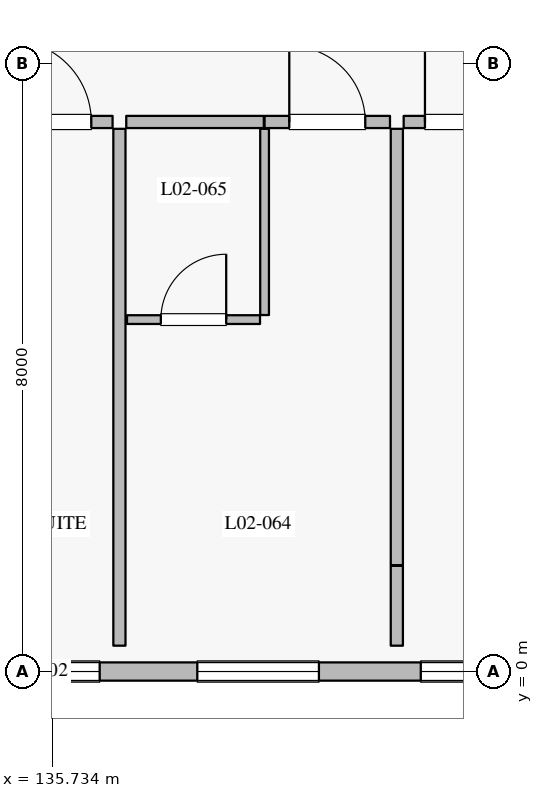
"""IFC4 building model, lengths in metres.
Left out: names, types, materials, properties, quantities, classifications, styles, units other than length and angle.
Written with IfcOpenShell. Run it as: python <this file> out.ifc"""

import sys

from ifc_helpers import new_model, si_unit, direction, frame, frame_2d, origin, place, context, subcontext, project, spatial, rectangle, extrude, element, fill, save


model = new_model("IFC4")
c1 = context("Model", 3, precision=1e-05, world=origin(), true_north=direction((0.0, 1.0)))
c2 = subcontext(c1, "Body", "Model", "MODEL_VIEW")
j1 = project(units=[si_unit("LENGTHUNIT", "METRE"), si_unit("PLANEANGLEUNIT", "RADIAN")], contexts=[c1])
p1 = place(None, origin())
s1 = spatial("IfcSite", under=j1, at=p1, CompositionType="ELEMENT")
p2 = place(p1, origin())
s2 = spatial("IfcBuilding", under=s1, at=p2, CompositionType="ELEMENT")
p3 = place(p2, frame((0.0, 0.0, 11.4)))
s3 = spatial("IfcBuildingStorey", under=s2, at=p3, CompositionType="ELEMENT", Elevation=11.4)
p4 = place(p3, frame((142.4, 0.0, 0.0), z_axis=(0.0, 0.0, 1.0), x_axis=(-1.0, 0.0, 0.0)))
e1 = element("IfcWall", 1, at=p4, inside=s3, PredefinedType="SOLIDWALL", context=c2, shape_type="SweptSolid", body=[
    extrude(rectangle(XDim=7.6, YDim=0.24, at=frame_2d((3.8, 0.0))), origin(), (0.0, 0.0, 1.0), 4.13),
])
p5 = place(p4, frame((0.215, 0.0, 0.8)))
e2 = element("IfcOpeningElement", 2, at=p5, cuts=e1, PredefinedType="OPENING", context=c2, shape_type="SweptSolid", body=[
    extrude(rectangle(XDim=1.6, YDim=1.6, at=frame_2d((0.8, 0.8))), frame((0.0, 0.13, 0.0), z_axis=(0.0, -1.0, 0.0), x_axis=(1.0, 0.0, 0.0)), (0.0, 0.0, 1.0), 0.26),
])
p6 = place(p4, frame((3.155, 0.0, 0.8)))
e3 = element("IfcOpeningElement", 3, at=p6, cuts=e1, PredefinedType="OPENING", context=c2, shape_type="SweptSolid", body=[
    extrude(rectangle(XDim=1.6, YDim=1.6, at=frame_2d((0.8, 0.8))), frame((0.0, 0.13, 0.0), z_axis=(0.0, -1.0, 0.0), x_axis=(1.0, 0.0, 0.0)), (0.0, 0.0, 1.0), 0.26),
])
p7 = place(p4, frame((6.04, 0.0, 0.8)))
e4 = element("IfcOpeningElement", 4, at=p7, cuts=e1, PredefinedType="OPENING", context=c2, shape_type="SweptSolid", body=[
    extrude(rectangle(XDim=1.4, YDim=1.6, at=frame_2d((0.7, 0.8))), frame((0.0, 0.13, 0.0), z_axis=(0.0, -1.0, 0.0), x_axis=(1.0, 0.0, 0.0)), (0.0, 0.0, 1.0), 0.26),
])
p8 = place(p3, frame((134.89, 7.23, 0.0), z_axis=(0.0, 0.0, 1.0), x_axis=(1.0, 0.0, 0.0)))
e5 = element("IfcWall", 5, at=p8, inside=s3, PredefinedType="PARTITIONING", context=c2, shape_type="SweptSolid", body=[
    extrude(rectangle(XDim=1.64, YDim=0.16, at=frame_2d((0.82, 0.0))), origin(), (0.0, 0.0, 1.0), 4.535),
])
p9 = place(p8, frame((0.28, 0.0, 0.0)))
e6 = element("IfcOpeningElement", 6, at=p9, cuts=e5, PredefinedType="OPENING", context=c2, shape_type="SweptSolid", body=[
    extrude(rectangle(XDim=1.08, YDim=2.3, at=frame_2d((0.54, 1.15))), frame((0.0, 0.09, 0.0), z_axis=(0.0, -1.0, 0.0), x_axis=(1.0, 0.0, 0.0)), (0.0, 0.0, 1.0), 0.18),
])
p10 = place(p3, frame((136.71, 7.23, 0.0), z_axis=(0.0, 0.0, 1.0), x_axis=(1.0, 0.0, 0.0)))
e7 = element("IfcWall", 7, at=p10, inside=s3, PredefinedType="PARTITIONING", context=c2, shape_type="SweptSolid", body=[
    extrude(rectangle(XDim=1.81, YDim=0.16, at=frame_2d((0.905, 0.0))), origin(), (0.0, 0.0, 1.0), 4.535),
])
p11 = place(p3, frame((138.53, 7.23, 0.0), z_axis=(0.0, 0.0, 1.0), x_axis=(1.0, 0.0, 0.0)))
e8 = element("IfcWall", 8, at=p11, inside=s3, PredefinedType="PARTITIONING", context=c2, shape_type="SweptSolid", body=[
    extrude(rectangle(XDim=1.65, YDim=0.16, at=frame_2d((0.825, 0.0))), origin(), (0.0, 0.0, 1.0), 4.535),
])
p12 = place(p11, frame((0.325, 0.0, 0.0)))
e9 = element("IfcOpeningElement", 9, at=p12, cuts=e8, PredefinedType="OPENING", context=c2, shape_type="SweptSolid", body=[
    extrude(rectangle(XDim=1.0, YDim=2.25, at=frame_2d((0.5, 1.125))), frame((0.0, 0.09, 0.0), z_axis=(0.0, -1.0, 0.0), x_axis=(1.0, 0.0, 0.0)), (0.0, 0.0, 1.0), 0.18),
])
p13 = place(p3, frame((138.53, 4.69, 0.0), z_axis=(0.0, 0.0, 1.0), x_axis=(0.0, 1.0, 0.0)))
e10 = element("IfcWall", 10, at=p13, inside=s3, PredefinedType="PARTITIONING", context=c2, shape_type="SweptSolid", body=[
    extrude(rectangle(XDim=2.45, YDim=0.115, at=frame_2d((1.225, 0.0))), origin(), (0.0, 0.0, 1.0), 4.535),
])
p14 = place(p3, frame((136.72, 4.63, 0.0), z_axis=(0.0, 0.0, 1.0), x_axis=(1.0, 0.0, 0.0)))
e11 = element("IfcWall", 11, at=p14, inside=s3, PredefinedType="PARTITIONING", context=c2, shape_type="SweptSolid", body=[
    extrude(rectangle(XDim=1.75, YDim=0.115, at=frame_2d((0.875, 0.0))), origin(), (0.0, 0.0, 1.0), 4.535),
])
p15 = place(p14, frame((0.445, 0.0, 0.0)))
e12 = element("IfcOpeningElement", 12, at=p15, cuts=e11, PredefinedType="OPENING", context=c2, shape_type="SweptSolid", body=[
    extrude(rectangle(XDim=0.86, YDim=2.12, at=frame_2d((0.43, 1.06))), frame((0.0, 0.067, 0.0), z_axis=(0.0, -1.0, 0.0), x_axis=(1.0, 0.0, 0.0)), (0.0, 0.0, 1.0), 0.135),
])
p16 = place(p3, frame((136.62, 0.34, 0.0), z_axis=(0.0, 0.0, 1.0), x_axis=(0.0, 1.0, 0.0)))
e13 = element("IfcWall", 13, at=p16, inside=s3, PredefinedType="PARTITIONING", context=c2, shape_type="SweptSolid", body=[
    extrude(rectangle(XDim=6.8, YDim=0.16, at=frame_2d((3.4, 0.0))), origin(), (0.0, 0.0, 1.0), 4.535),
])
p17 = place(p3, frame((140.27, 0.34, 0.0), z_axis=(0.0, 0.0, 1.0), x_axis=(0.0, 1.0, 0.0)))
e14 = element("IfcWall", 14, at=p17, inside=s3, PredefinedType="PARTITIONING", context=c2, shape_type="SweptSolid", body=[
    extrude(rectangle(XDim=1.05, YDim=0.16, at=frame_2d((0.525, 0.0))), origin(), (0.0, 0.0, 1.0), 4.535),
])
p18 = place(p3, frame((140.36, 7.23, 0.0), z_axis=(0.0, 0.0, 1.0), x_axis=(1.0, 0.0, 0.0)))
e15 = element("IfcWall", 15, at=p18, inside=s3, PredefinedType="PARTITIONING", context=c2, shape_type="SweptSolid", body=[
    extrude(rectangle(XDim=1.64, YDim=0.16, at=frame_2d((0.82, 0.0))), origin(), (0.0, 0.0, 1.0), 4.535),
])
p19 = place(p18, frame((0.28, 0.0, 0.0)))
e16 = element("IfcOpeningElement", 16, at=p19, cuts=e15, PredefinedType="OPENING", context=c2, shape_type="SweptSolid", body=[
    extrude(rectangle(XDim=1.08, YDim=2.3, at=frame_2d((0.54, 1.15))), frame((0.0, 0.09, 0.0), z_axis=(0.0, -1.0, 0.0), x_axis=(1.0, 0.0, 0.0)), (0.0, 0.0, 1.0), 0.18),
])
p20 = place(p3, frame((140.27, 1.4, 0.0), z_axis=(0.0, 0.0, 1.0), x_axis=(0.0, 1.0, 0.0)))
e17 = element("IfcWall", 17, at=p20, inside=s3, PredefinedType="PARTITIONING", context=c2, shape_type="SweptSolid", body=[
    extrude(rectangle(XDim=5.74, YDim=0.16, at=frame_2d((2.87, 0.0))), origin(), (0.0, 0.0, 1.0), 4.535),
])
p21 = place(p5, origin())
e18 = element("IfcWindow", 18, at=p21, inside=s3, PartitioningType="SINGLE_PANEL", PredefinedType="WINDOW", context=c2, shape_type="SweptSolid", body=[
    extrude(rectangle(XDim=1.6, YDim=1.6, at=frame_2d((0.8, 0.8))), frame((0.0, 0.03, 0.0), z_axis=(0.0, -1.0, 0.0), x_axis=(1.0, 0.0, 0.0)), (0.0, 0.0, 1.0), 0.06),
])
fill(e2, e18)
p22 = place(p6, origin())
e19 = element("IfcWindow", 19, at=p22, inside=s3, PartitioningType="SINGLE_PANEL", PredefinedType="WINDOW", context=c2, shape_type="SweptSolid", body=[
    extrude(rectangle(XDim=1.6, YDim=1.6, at=frame_2d((0.8, 0.8))), frame((0.0, 0.03, 0.0), z_axis=(0.0, -1.0, 0.0), x_axis=(1.0, 0.0, 0.0)), (0.0, 0.0, 1.0), 0.06),
])
fill(e3, e19)
p23 = place(p7, origin())
e20 = element("IfcWindow", 20, at=p23, inside=s3, PartitioningType="SINGLE_PANEL", PredefinedType="WINDOW", context=c2, shape_type="SweptSolid", body=[
    extrude(rectangle(XDim=1.4, YDim=1.6, at=frame_2d((0.7, 0.8))), frame((0.0, 0.03, 0.0), z_axis=(0.0, -1.0, 0.0), x_axis=(1.0, 0.0, 0.0)), (0.0, 0.0, 1.0), 0.06),
])
fill(e4, e20)
p24 = place(p9, origin())
e21 = element("IfcDoor", 21, at=p24, inside=s3, OperationType="SINGLE_SWING_LEFT", PredefinedType="DOOR", context=c2, shape_type="SweptSolid", body=[
    extrude(rectangle(XDim=1.08, YDim=2.3, at=frame_2d((0.54, 1.15))), frame((0.0, 0.025, 0.0), z_axis=(0.0, -1.0, 0.0), x_axis=(1.0, 0.0, 0.0)), (0.0, 0.0, 1.0), 0.05),
])
fill(e6, e21)
p25 = place(p12, origin())
e22 = element("IfcDoor", 22, at=p25, inside=s3, OperationType="SINGLE_SWING_LEFT", PredefinedType="DOOR", context=c2, shape_type="SweptSolid", body=[
    extrude(rectangle(XDim=1.0, YDim=2.25, at=frame_2d((0.5, 1.125))), frame((0.0, 0.025, 0.0), z_axis=(0.0, -1.0, 0.0), x_axis=(1.0, 0.0, 0.0)), (0.0, 0.0, 1.0), 0.05),
])
fill(e9, e22)
p26 = place(p15, origin())
e23 = element("IfcDoor", 23, at=p26, inside=s3, OperationType="SINGLE_SWING_RIGHT", PredefinedType="DOOR", context=c2, shape_type="SweptSolid", body=[
    extrude(rectangle(XDim=0.86, YDim=2.12, at=frame_2d((0.43, 1.06))), frame((0.0, 0.025, 0.0), z_axis=(0.0, -1.0, 0.0), x_axis=(1.0, 0.0, 0.0)), (0.0, 0.0, 1.0), 0.05),
])
fill(e12, e23)
p27 = place(p19, origin())
e24 = element("IfcDoor", 24, at=p27, inside=s3, OperationType="SINGLE_SWING_LEFT", PredefinedType="DOOR", context=c2, shape_type="SweptSolid", body=[
    extrude(rectangle(XDim=1.08, YDim=2.3, at=frame_2d((0.54, 1.15))), frame((0.0, 0.025, 0.0), z_axis=(0.0, -1.0, 0.0), x_axis=(1.0, 0.0, 0.0)), (0.0, 0.0, 1.0), 0.05),
])
fill(e16, e24)
save(model, sys.argv[1])
